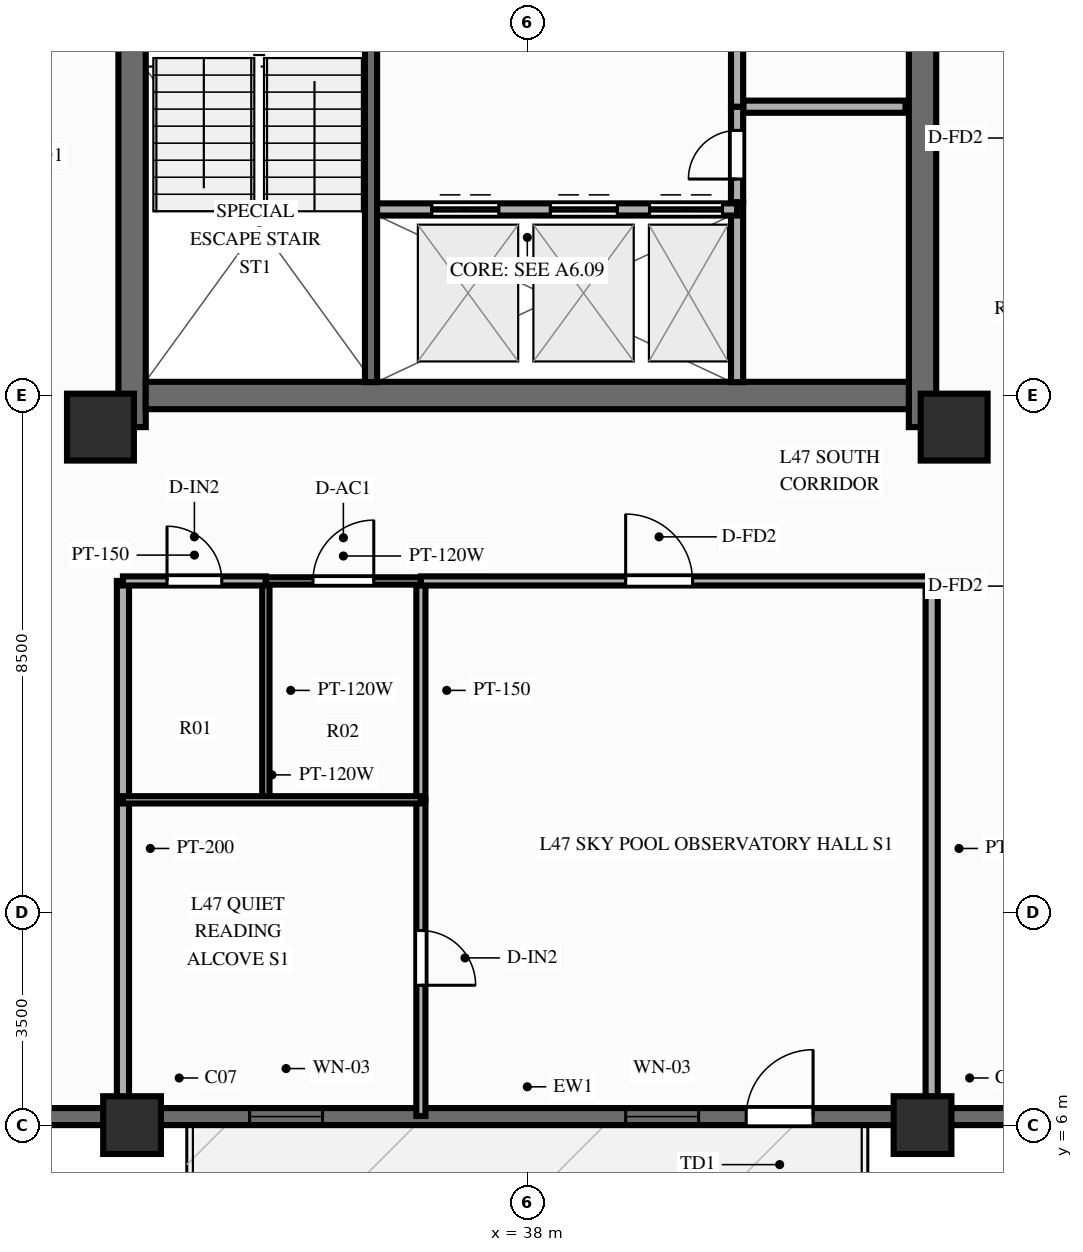
"""IFC4 building model, lengths in metres.
Left out: names, types, materials, properties, quantities, classifications, styles, units other than length and angle.
Written with IfcOpenShell. Run it as: python <this file> out.ifc"""

import sys

from ifc_helpers import new_model, si_unit, direction, frame, frame_2d, origin, origin_2d, place, context, subcontext, project, spatial, rectangle, extrude, source, transform, mapped, element, fill, save


model = new_model("IFC4")
c1 = context("Model", 3, precision=1e-05, world=origin(), true_north=direction((0.0, 1.0)))
c2 = subcontext(c1, "Body", "Model", "MODEL_VIEW")
j1 = project(units=[si_unit("LENGTHUNIT", "METRE"), si_unit("PLANEANGLEUNIT", "RADIAN")], contexts=[c1])
p1 = place(None, origin())
s1 = spatial("IfcSite", under=j1, at=p1, CompositionType="ELEMENT")
p2 = place(p1, origin())
s2 = spatial("IfcBuilding", under=s1, at=p2, CompositionType="ELEMENT")
p3 = place(p2, frame((0.0, 0.0, 148.7)))
s3 = spatial("IfcBuildingStorey", under=s2, at=p3, CompositionType="ELEMENT", Elevation=148.7)
p4 = place(p3, frame((31.5, 17.48, 0.0), z_axis=(0.0, 0.0, 1.0), x_axis=(0.0, 1.0, 0.0)))
e1 = element("IfcWall", 1, at=p4, inside=s3, PredefinedType="SHEAR", context=c2, shape_type="SweptSolid", body=[
    extrude(rectangle(XDim=19.04, YDim=0.45, at=frame_2d((9.52, 0.0))), origin(), (0.0, 0.0, 1.0), 3.5),
])
p5 = place(p4, frame((6.32, 0.0, 0.0)))
e2 = element("IfcOpeningElement", 2, at=p5, cuts=e1, PredefinedType="OPENING", context=c2, shape_type="SweptSolid", body=[
    extrude(rectangle(XDim=1.1, YDim=2.15, at=frame_2d((0.55, 1.075))), frame((0.0, 0.237, 0.0), z_axis=(0.0, -1.0, 0.0), x_axis=(1.0, 0.0, 0.0)), (0.0, 0.0, 1.0), 0.474),
])
p6 = place(p3, frame((44.5, 17.48, 0.0), z_axis=(0.0, 0.0, 1.0), x_axis=(0.0, 1.0, 0.0)))
e3 = element("IfcWall", 3, at=p6, inside=s3, PredefinedType="SHEAR", context=c2, shape_type="SweptSolid", body=[
    extrude(rectangle(XDim=19.04, YDim=0.45, at=frame_2d((9.52, 0.0))), origin(), (0.0, 0.0, 1.0), 3.5),
])
p7 = place(p6, frame((12.67, 0.0, 0.0), z_axis=(0.0, 0.0, 1.0), x_axis=(-1.0, 0.0, 0.0)))
e4 = element("IfcOpeningElement", 4, at=p7, cuts=e3, PredefinedType="OPENING", context=c2, shape_type="SweptSolid", body=[
    extrude(rectangle(XDim=1.1, YDim=2.15, at=frame_2d((0.55, 1.075))), frame((0.0, 0.237, 0.0), z_axis=(0.0, -1.0, 0.0), x_axis=(1.0, 0.0, 0.0)), (0.0, 0.0, 1.0), 0.474),
])
p8 = place(p3, frame((31.725, 18.0, 0.0), z_axis=(0.0, 0.0, 1.0), x_axis=(1.0, 0.0, 0.0)))
e5 = element("IfcWall", 5, at=p8, inside=s3, PredefinedType="SHEAR", context=c2, shape_type="SweptSolid", body=[
    extrude(rectangle(XDim=12.55, YDim=0.45, at=frame_2d((6.275, 0.0))), origin(), (0.0, 0.0, 1.0), 3.5),
])
m1 = source(origin(), c2, "Body", "SweptSolid", [
    extrude(rectangle(XDim=1.1, YDim=1.1, at=origin_2d()), origin(), (0.0, 0.0, 1.0), 3.5),
])
for number, where, z_axis, x_axis in (
    (6, (30.98, 17.48, 0.0), (0.0, 0.0, 1.0), (1.0, 0.0, 0.0)),
    (7, (45.02, 17.48, 0.0), (0.0, 0.0, 1.0), (1.0, 0.0, 0.0)),
):
    element("IfcColumn", number, at=place(p3, frame(where, z_axis=z_axis, x_axis=x_axis)), inside=s3, PredefinedType="COLUMN", context=c2, shape_type="MappedRepresentation", body=[
        mapped(m1, transform((0.0, 0.0, 0.0), scale=1.0)),
    ])
m2 = source(origin(), c2, "Body", "SweptSolid", [
    extrude(rectangle(XDim=0.95, YDim=0.95, at=origin_2d()), origin(), (0.0, 0.0, 1.0), 3.5),
])
for number, where, z_axis, x_axis in (
    (8, (31.5, 6.0, 0.0), (0.0, 0.0, 1.0), (1.0, 0.0, 0.0)),
    (9, (44.5, 6.0, 0.0), (0.0, 0.0, 1.0), (1.0, 0.0, 0.0)),
):
    element("IfcColumn", number, at=place(p3, frame(where, z_axis=z_axis, x_axis=x_axis)), inside=s3, PredefinedType="COLUMN", context=c2, shape_type="MappedRepresentation", body=[
        mapped(m2, transform((0.0, 0.0, 0.0), scale=1.0)),
    ])
p9 = place(p3, frame((21.0, 6.14, 0.0), z_axis=(0.0, 0.0, 1.0), x_axis=(1.0, 0.0, 0.0)))
e10 = element("IfcWall", 10, at=p9, inside=s3, PredefinedType="SOLIDWALL", context=c2, shape_type="SweptSolid", body=[
    extrude(rectangle(XDim=34.0, YDim=0.28, at=frame_2d((17.0, 0.0))), origin(), (0.0, 0.0, 1.0), 2.39),
])
p10 = place(p9, frame((4.65, 0.0, 0.25)))
e11 = element("IfcOpeningElement", 11, at=p10, cuts=e10, PredefinedType="OPENING", context=c2, shape_type="SweptSolid", body=[
    extrude(rectangle(XDim=1.2, YDim=1.5, at=frame_2d((0.6, 0.75))), frame((0.0, 0.152, 0.0), z_axis=(0.0, -1.0, 0.0), x_axis=(1.0, 0.0, 0.0)), (0.0, 0.0, 1.0), 0.304),
])
p11 = place(p9, frame((12.433, 0.0, 0.25)))
e12 = element("IfcOpeningElement", 12, at=p11, cuts=e10, PredefinedType="OPENING", context=c2, shape_type="SweptSolid", body=[
    extrude(rectangle(XDim=1.2, YDim=1.5, at=frame_2d((0.6, 0.75))), frame((0.0, 0.152, 0.0), z_axis=(0.0, -1.0, 0.0), x_axis=(1.0, 0.0, 0.0)), (0.0, 0.0, 1.0), 0.304),
])
p12 = place(p9, frame((18.617, 0.0, 0.25)))
e13 = element("IfcOpeningElement", 13, at=p12, cuts=e10, PredefinedType="OPENING", context=c2, shape_type="SweptSolid", body=[
    extrude(rectangle(XDim=1.2, YDim=1.5, at=frame_2d((0.6, 0.75))), frame((0.0, 0.152, 0.0), z_axis=(0.0, -1.0, 0.0), x_axis=(1.0, 0.0, 0.0)), (0.0, 0.0, 1.0), 0.304),
])
p13 = place(p9, frame((28.15, 0.0, 0.25)))
e14 = element("IfcOpeningElement", 14, at=p13, cuts=e10, PredefinedType="OPENING", context=c2, shape_type="SweptSolid", body=[
    extrude(rectangle(XDim=1.2, YDim=1.5, at=frame_2d((0.6, 0.75))), frame((0.0, 0.152, 0.0), z_axis=(0.0, -1.0, 0.0), x_axis=(1.0, 0.0, 0.0)), (0.0, 0.0, 1.0), 0.304),
])
p14 = place(p9, frame((21.7, 0.0, 0.0), z_axis=(0.0, 0.0, 1.0), x_axis=(-1.0, 0.0, 0.0)))
e15 = element("IfcOpeningElement", 15, at=p14, cuts=e10, PredefinedType="OPENING", context=c2, shape_type="SweptSolid", body=[
    extrude(rectangle(XDim=1.1, YDim=2.15, at=frame_2d((0.55, 1.075))), frame((0.0, 0.152, 0.0), z_axis=(0.0, -1.0, 0.0), x_axis=(1.0, 0.0, 0.0)), (0.0, 0.0, 1.0), 0.304),
])
p15 = place(p3, frame((41.55, 22.75, 0.0), z_axis=(0.0, 0.0, 1.0), x_axis=(1.0, 0.0, 0.0)))
e16 = element("IfcWall", 16, at=p15, inside=s3, PredefinedType="PARTITIONING", context=c2, shape_type="SweptSolid", body=[
    extrude(rectangle(XDim=2.67, YDim=0.2, at=frame_2d((1.335, 0.0))), origin(), (0.0, 0.0, 1.0), 3.16),
])
p16 = place(p3, frame((41.45, 18.22, 0.0), z_axis=(0.0, 0.0, 1.0), x_axis=(0.0, 1.0, 0.0)))
e17 = element("IfcWall", 17, at=p16, inside=s3, PredefinedType="PARTITIONING", context=c2, shape_type="SweptSolid", body=[
    extrude(rectangle(XDim=2.96, YDim=0.2, at=frame_2d((1.48, 0.0))), origin(), (0.0, 0.0, 1.0), 3.16),
])
p17 = place(p3, frame((41.45, 21.18, 0.0), z_axis=(0.0, 0.0, 1.0), x_axis=(0.0, 1.0, 0.0)))
e18 = element("IfcWall", 18, at=p17, inside=s3, PredefinedType="PARTITIONING", context=c2, shape_type="SweptSolid", body=[
    extrude(rectangle(XDim=1.57, YDim=0.2, at=frame_2d((0.785, 0.0))), origin(), (0.0, 0.0, 1.0), 3.16),
])
p18 = place(p17, frame((0.38, 0.0, 0.0)))
e19 = element("IfcOpeningElement", 19, at=p18, cuts=e18, PredefinedType="OPENING", context=c2, shape_type="SweptSolid", body=[
    extrude(rectangle(XDim=0.8, YDim=2.05, at=frame_2d((0.4, 1.025))), frame((0.0, 0.112, 0.0), z_axis=(0.0, -1.0, 0.0), x_axis=(1.0, 0.0, 0.0)), (0.0, 0.0, 1.0), 0.224),
])
p19 = place(p3, frame((41.45, 22.75, 0.0), z_axis=(0.0, 0.0, 1.0), x_axis=(0.0, 1.0, 0.0)))
e20 = element("IfcWall", 20, at=p19, inside=s3, PredefinedType="PARTITIONING", context=c2, shape_type="SweptSolid", body=[
    extrude(rectangle(XDim=2.95, YDim=0.2, at=frame_2d((1.475, 0.0))), origin(), (0.0, 0.0, 1.0), 3.16),
])
p20 = place(p19, frame((1.05, 0.0, 0.0)))
e21 = element("IfcOpeningElement", 21, at=p20, cuts=e20, PredefinedType="OPENING", context=c2, shape_type="SweptSolid", body=[
    extrude(rectangle(XDim=0.8, YDim=2.05, at=frame_2d((0.4, 1.025))), frame((0.0, 0.112, 0.0), z_axis=(0.0, -1.0, 0.0), x_axis=(1.0, 0.0, 0.0)), (0.0, 0.0, 1.0), 0.224),
])
p21 = place(p3, frame((35.43, 21.06, 0.0), z_axis=(0.0, 0.0, 1.0), x_axis=(1.0, 0.0, 0.0)))
e22 = element("IfcWall", 22, at=p21, inside=s3, PredefinedType="PARTITIONING", context=c2, shape_type="SweptSolid", body=[
    extrude(rectangle(XDim=6.02, YDim=0.2, at=frame_2d((3.01, 0.0))), origin(), (0.0, 0.0, 1.0), 3.16),
])
p22 = place(p21, frame((1.0, 0.0, 0.0)))
e23 = element("IfcOpeningElement", 23, at=p22, cuts=e22, PredefinedType="OPENING", context=c2, shape_type="SweptSolid", body=[
    extrude(rectangle(XDim=1.1, YDim=2.15, at=frame_2d((0.55, 1.075))), frame((0.0, 0.112, 0.0), z_axis=(0.0, -1.0, 0.0), x_axis=(1.0, 0.0, 0.0)), (0.0, 0.0, 1.0), 0.224),
])
p23 = place(p21, frame((2.95, 0.0, 0.0)))
e24 = element("IfcOpeningElement", 24, at=p23, cuts=e22, PredefinedType="OPENING", context=c2, shape_type="SweptSolid", body=[
    extrude(rectangle(XDim=1.1, YDim=2.15, at=frame_2d((0.55, 1.075))), frame((0.0, 0.112, 0.0), z_axis=(0.0, -1.0, 0.0), x_axis=(1.0, 0.0, 0.0)), (0.0, 0.0, 1.0), 0.224),
])
p24 = place(p21, frame((4.58, 0.0, 0.0)))
e25 = element("IfcOpeningElement", 25, at=p24, cuts=e22, PredefinedType="OPENING", context=c2, shape_type="SweptSolid", body=[
    extrude(rectangle(XDim=1.2, YDim=2.15, at=frame_2d((0.6, 1.075))), frame((0.0, 0.112, 0.0), z_axis=(0.0, -1.0, 0.0), x_axis=(1.0, 0.0, 0.0)), (0.0, 0.0, 1.0), 0.224),
])
p25 = place(p3, frame((35.43, 18.22, 0.0), z_axis=(0.0, 0.0, 1.0), x_axis=(0.0, 1.0, 0.0)))
e26 = element("IfcWall", 26, at=p25, inside=s3, PredefinedType="SOLIDWALL", context=c2, shape_type="SweptSolid", body=[
    extrude(rectangle(XDim=7.22, YDim=0.2, at=frame_2d((3.61, 0.0))), origin(), (0.0, 0.0, 1.0), 3.29),
])
p26 = place(p25, frame((6.68, 0.0, 0.0), z_axis=(0.0, 0.0, 1.0), x_axis=(-1.0, 0.0, 0.0)))
e27 = element("IfcOpeningElement", 27, at=p26, cuts=e26, PredefinedType="OPENING", context=c2, shape_type="SweptSolid", body=[
    extrude(rectangle(XDim=1.1, YDim=2.15, at=frame_2d((0.55, 1.075))), frame((0.0, 0.112, 0.0), z_axis=(0.0, -1.0, 0.0), x_axis=(1.0, 0.0, 0.0)), (0.0, 0.0, 1.0), 0.224),
])
for number, where, z_axis, x_axis in (
    (28, (31.35, 14.95, 0.0), (0.0, 0.0, 1.0), (0.0, -1.0, 0.0)),
    (29, (44.65, 14.95, 0.0), (0.0, 0.0, 1.0), (0.0, -1.0, 0.0)),
):
    element("IfcWall", number, at=place(p3, frame(where, z_axis=z_axis, x_axis=x_axis)), inside=s3, PredefinedType="PARTITIONING", context=c2, shape_type="SweptSolid", body=[
        extrude(rectangle(XDim=8.8, YDim=0.2, at=frame_2d((4.4, 0.0))), origin(), (0.0, 0.0, 1.0), 2.39),
    ])
p27 = place(p3, frame((33.7, 14.95, 0.0), z_axis=(0.0, 0.0, 1.0), x_axis=(0.0, -1.0, 0.0)))
e30 = element("IfcWall", 30, at=p27, inside=s3, PredefinedType="PARTITIONING", context=c2, shape_type="SweptSolid", body=[
    extrude(rectangle(XDim=3.6, YDim=0.12, at=frame_2d((1.8, 0.0))), origin(), (0.0, 0.0, 1.0), 3.16),
])
p28 = place(p3, frame((36.25, 14.95, 0.0), z_axis=(0.0, 0.0, 1.0), x_axis=(0.0, -1.0, 0.0)))
e31 = element("IfcWall", 31, at=p28, inside=s3, PredefinedType="PARTITIONING", context=c2, shape_type="SweptSolid", body=[
    extrude(rectangle(XDim=3.6, YDim=0.15, at=frame_2d((1.8, 0.0))), origin(), (0.0, 0.0, 1.0), 3.16),
])
p29 = place(p3, frame((36.25, 11.35, 0.0), z_axis=(0.0, 0.0, 1.0), x_axis=(0.0, -1.0, 0.0)))
e32 = element("IfcWall", 32, at=p29, inside=s3, PredefinedType="PARTITIONING", context=c2, shape_type="SweptSolid", body=[
    extrude(rectangle(XDim=5.2, YDim=0.15, at=frame_2d((2.6, 0.0))), origin(), (0.0, 0.0, 1.0), 3.16),
])
p30 = place(p29, frame((2.15, 0.0, 0.0)))
e33 = element("IfcOpeningElement", 33, at=p30, cuts=e32, PredefinedType="OPENING", context=c2, shape_type="SweptSolid", body=[
    extrude(rectangle(XDim=0.9, YDim=2.1, at=frame_2d((0.45, 1.05))), frame((0.0, 0.087, 0.0), z_axis=(0.0, -1.0, 0.0), x_axis=(1.0, 0.0, 0.0)), (0.0, 0.0, 1.0), 0.174),
])
p31 = place(p3, frame((31.35, 11.35, 0.0), z_axis=(0.0, 0.0, 1.0), x_axis=(1.0, 0.0, 0.0)))
e34 = element("IfcWall", 34, at=p31, inside=s3, PredefinedType="PARTITIONING", context=c2, shape_type="SweptSolid", body=[
    extrude(rectangle(XDim=4.9, YDim=0.12, at=frame_2d((2.45, 0.0))), origin(), (0.0, 0.0, 1.0), 2.89),
])
p32 = place(p3, frame((31.35, 14.95, 0.0), z_axis=(0.0, 0.0, 1.0), x_axis=(1.0, 0.0, 0.0)))
e35 = element("IfcWall", 35, at=p32, inside=s3, PredefinedType="PARTITIONING", context=c2, shape_type="SweptSolid", body=[
    extrude(rectangle(XDim=2.35, YDim=0.15, at=frame_2d((1.175, 0.0))), origin(), (0.0, 0.0, 1.0), 3.16),
])
p33 = place(p32, frame((0.725, 0.0, 0.0)))
e36 = element("IfcOpeningElement", 36, at=p33, cuts=e35, PredefinedType="OPENING", context=c2, shape_type="SweptSolid", body=[
    extrude(rectangle(XDim=0.9, YDim=2.1, at=frame_2d((0.45, 1.05))), frame((0.0, 0.087, 0.0), z_axis=(0.0, -1.0, 0.0), x_axis=(1.0, 0.0, 0.0)), (0.0, 0.0, 1.0), 0.174),
])
p34 = place(p3, frame((33.7, 14.95, 0.0), z_axis=(0.0, 0.0, 1.0), x_axis=(1.0, 0.0, 0.0)))
e37 = element("IfcWall", 37, at=p34, inside=s3, PredefinedType="PARTITIONING", context=c2, shape_type="SweptSolid", body=[
    extrude(rectangle(XDim=2.55, YDim=0.12, at=frame_2d((1.275, 0.0))), origin(), (0.0, 0.0, 1.0), 3.16),
])
p35 = place(p34, frame((0.775, 0.0, 0.0)))
e38 = element("IfcOpeningElement", 38, at=p35, cuts=e37, PredefinedType="OPENING", context=c2, shape_type="SweptSolid", body=[
    extrude(rectangle(XDim=1.0, YDim=2.1, at=frame_2d((0.5, 1.05))), frame((0.0, 0.072, 0.0), z_axis=(0.0, -1.0, 0.0), x_axis=(1.0, 0.0, 0.0)), (0.0, 0.0, 1.0), 0.144),
])
p36 = place(p3, frame((36.25, 14.95, 0.0), z_axis=(0.0, 0.0, 1.0), x_axis=(1.0, 0.0, 0.0)))
e39 = element("IfcWall", 39, at=p36, inside=s3, PredefinedType="PARTITIONING", context=c2, shape_type="SweptSolid", body=[
    extrude(rectangle(XDim=8.4, YDim=0.15, at=frame_2d((4.2, 0.0))), origin(), (0.0, 0.0, 1.0), 3.16),
])
p37 = place(p36, frame((3.367, 0.0, 0.0)))
e40 = element("IfcOpeningElement", 40, at=p37, cuts=e39, PredefinedType="OPENING", context=c2, shape_type="SweptSolid", body=[
    extrude(rectangle(XDim=1.1, YDim=2.15, at=frame_2d((0.55, 1.075))), frame((0.0, 0.087, 0.0), z_axis=(0.0, -1.0, 0.0), x_axis=(1.0, 0.0, 0.0)), (0.0, 0.0, 1.0), 0.174),
])
m3 = source(origin(), c2, "Body", "SweptSolid", [
    extrude(rectangle(XDim=1.2, YDim=1.5, at=frame_2d((0.6, 0.75))), frame((0.0, 0.03, 0.0), z_axis=(0.0, -1.0, 0.0), x_axis=(1.0, 0.0, 0.0)), (0.0, 0.0, 1.0), 0.06),
])
p38 = place(p11, origin())
e41 = element("IfcWindow", 41, at=p38, inside=s3, PartitioningType="SINGLE_PANEL", PredefinedType="WINDOW", context=c2, shape_type="MappedRepresentation", body=[
    mapped(m3, transform((0.0, 0.0, 0.0), scale=1.0)),
])
fill(e12, e41)
p39 = place(p12, origin())
e42 = element("IfcWindow", 42, at=p39, inside=s3, PartitioningType="SINGLE_PANEL", PredefinedType="WINDOW", context=c2, shape_type="MappedRepresentation", body=[
    mapped(m3, transform((0.0, 0.0, 0.0), scale=1.0)),
])
fill(e13, e42)
m4 = source(origin(), c2, "Body", "SweptSolid", [
    extrude(rectangle(XDim=1.1, YDim=2.15, at=frame_2d((0.55, 1.075))), frame((0.0, 0.025, 0.0), z_axis=(0.0, -1.0, 0.0), x_axis=(1.0, 0.0, 0.0)), (0.0, 0.0, 1.0), 0.05),
])
p40 = place(p14, origin())
e43 = element("IfcDoor", 43, at=p40, inside=s3, OperationType="SINGLE_SWING_LEFT", PredefinedType="DOOR", context=c2, shape_type="MappedRepresentation", body=[
    mapped(m4, transform((0.0, 0.0, 0.0), scale=1.0)),
])
fill(e15, e43)
m5 = source(origin(), c2, "Body", "SweptSolid", [
    extrude(rectangle(XDim=0.8, YDim=2.05, at=frame_2d((0.4, 1.025))), frame((0.0, 0.025, 0.0), z_axis=(0.0, -1.0, 0.0), x_axis=(1.0, 0.0, 0.0)), (0.0, 0.0, 1.0), 0.05),
])
p41 = place(p18, origin())
e44 = element("IfcDoor", 44, at=p41, inside=s3, OperationType="SINGLE_SWING_LEFT", PredefinedType="DOOR", context=c2, shape_type="MappedRepresentation", body=[
    mapped(m5, transform((0.0, 0.0, 0.0), scale=1.0)),
])
fill(e19, e44)
p42 = place(p22, origin())
e45 = element("IfcDoor", 45, at=p42, inside=s3, OperationType="DOUBLE_DOOR_SLIDING", PredefinedType="DOOR", context=c2, shape_type="MappedRepresentation", body=[
    mapped(m4, transform((0.0, 0.0, 0.0), scale=1.0)),
])
fill(e23, e45)
p43 = place(p23, origin())
e46 = element("IfcDoor", 46, at=p43, inside=s3, OperationType="DOUBLE_DOOR_SLIDING", PredefinedType="DOOR", context=c2, shape_type="MappedRepresentation", body=[
    mapped(m4, transform((0.0, 0.0, 0.0), scale=1.0)),
])
fill(e24, e46)
m6 = source(origin(), c2, "Body", "SweptSolid", [
    extrude(rectangle(XDim=1.2, YDim=2.15, at=frame_2d((0.6, 1.075))), frame((0.0, 0.025, 0.0), z_axis=(0.0, -1.0, 0.0), x_axis=(1.0, 0.0, 0.0)), (0.0, 0.0, 1.0), 0.05),
])
p44 = place(p24, origin())
e47 = element("IfcDoor", 47, at=p44, inside=s3, OperationType="DOUBLE_DOOR_SLIDING", PredefinedType="DOOR", context=c2, shape_type="MappedRepresentation", body=[
    mapped(m6, transform((0.0, 0.0, 0.0), scale=1.0)),
])
fill(e25, e47)
m7 = source(origin(), c2, "Body", "SweptSolid", [
    extrude(rectangle(XDim=0.9, YDim=2.1, at=frame_2d((0.45, 1.05))), frame((0.0, 0.025, 0.0), z_axis=(0.0, -1.0, 0.0), x_axis=(1.0, 0.0, 0.0)), (0.0, 0.0, 1.0), 0.05),
])
p45 = place(p30, origin())
e48 = element("IfcDoor", 48, at=p45, inside=s3, OperationType="SINGLE_SWING_RIGHT", PredefinedType="DOOR", context=c2, shape_type="MappedRepresentation", body=[
    mapped(m7, transform((0.0, 0.0, 0.0), scale=1.0)),
])
fill(e33, e48)
p46 = place(p33, origin())
e49 = element("IfcDoor", 49, at=p46, inside=s3, OperationType="SINGLE_SWING_LEFT", PredefinedType="DOOR", context=c2, shape_type="MappedRepresentation", body=[
    mapped(m7, transform((0.0, 0.0, 0.0), scale=1.0)),
])
fill(e36, e49)
m8 = source(origin(), c2, "Body", "SweptSolid", [
    extrude(rectangle(XDim=1.0, YDim=2.1, at=frame_2d((0.5, 1.05))), frame((0.0, 0.025, 0.0), z_axis=(0.0, -1.0, 0.0), x_axis=(1.0, 0.0, 0.0)), (0.0, 0.0, 1.0), 0.05),
])
p47 = place(p35, origin())
e50 = element("IfcDoor", 50, at=p47, inside=s3, OperationType="SINGLE_SWING_RIGHT", PredefinedType="DOOR", context=c2, shape_type="MappedRepresentation", body=[
    mapped(m8, transform((0.0, 0.0, 0.0), scale=1.0)),
])
fill(e38, e50)
p48 = place(p37, origin())
e51 = element("IfcDoor", 51, at=p48, inside=s3, OperationType="SINGLE_SWING_LEFT", PredefinedType="DOOR", context=c2, shape_type="MappedRepresentation", body=[
    mapped(m4, transform((0.0, 0.0, 0.0), scale=1.0)),
])
fill(e40, e51)
save(model, sys.argv[1])
